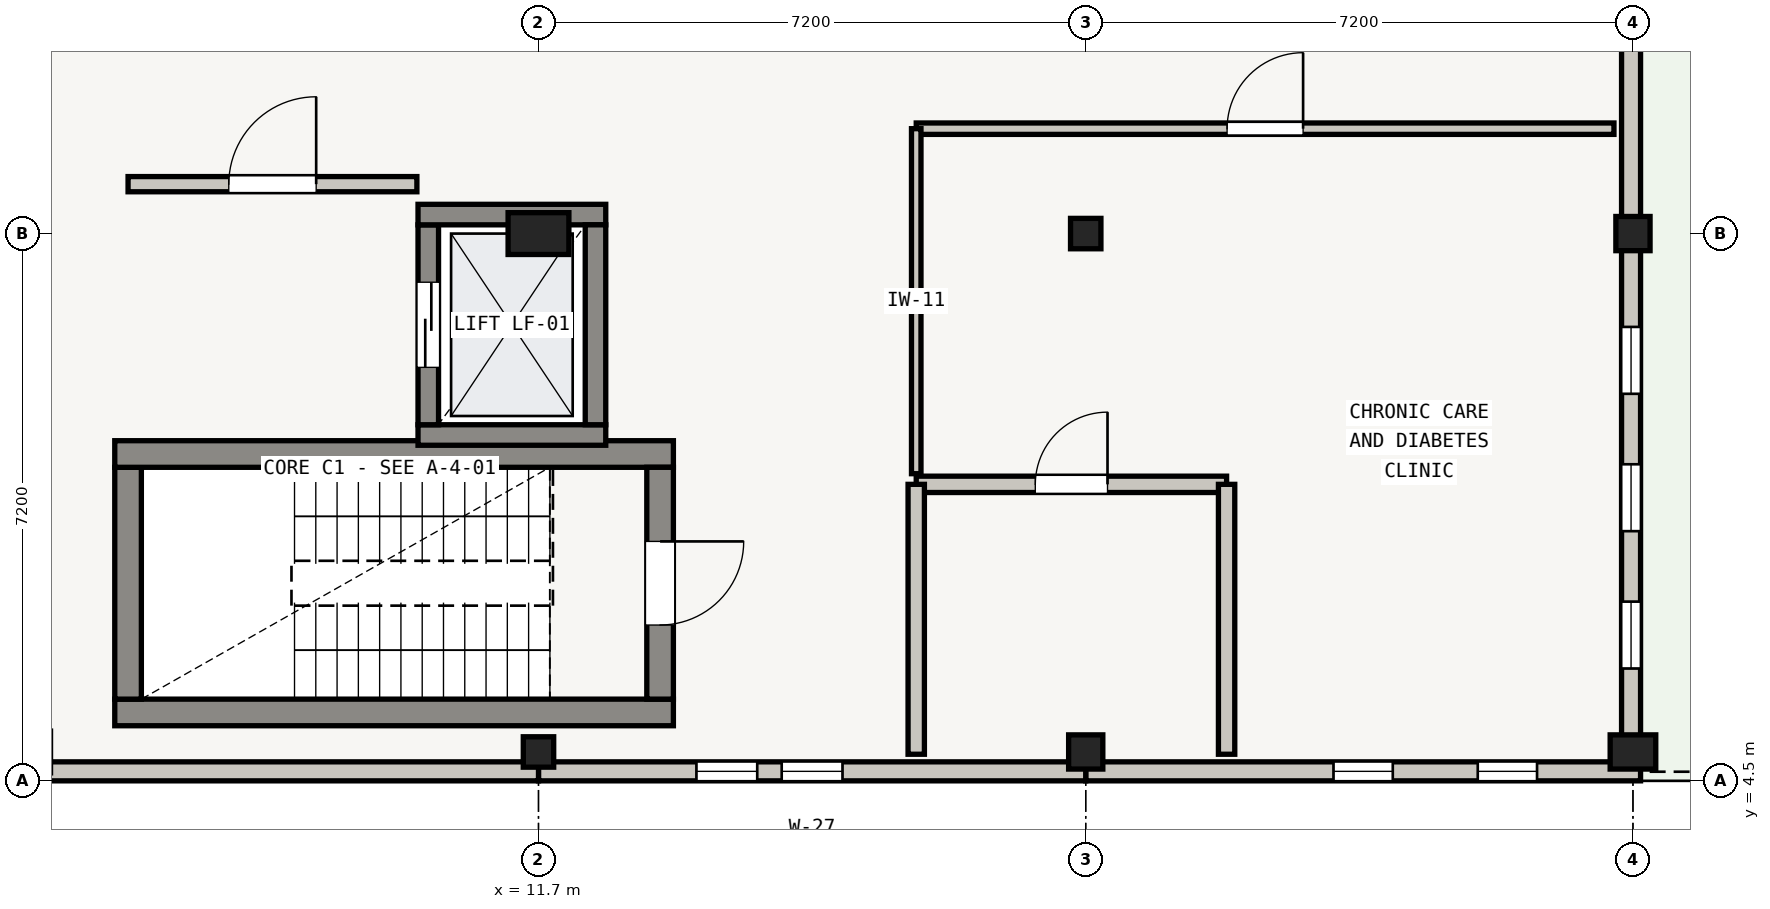
"""IFC4 building model, lengths in metres.
Left out: names, types, materials, properties, quantities, classifications, styles, units other than length and angle.
Written with IfcOpenShell. Run it as: python <this file> out.ifc"""

import sys

from ifc_helpers import new_model, si_unit, direction, frame, frame_2d, origin, origin_2d, place, context, subcontext, project, spatial, rectangle, extrude, element, fill, save


model = new_model("IFC4")
c1 = context("Model", 3, precision=1e-05, world=origin(), true_north=direction((0.0, 1.0)))
c2 = subcontext(c1, "Body", "Model", "MODEL_VIEW")
j1 = project(units=[si_unit("LENGTHUNIT", "METRE"), si_unit("PLANEANGLEUNIT", "RADIAN")], contexts=[c1])
p1 = place(None, origin())
s1 = spatial("IfcSite", under=j1, at=p1, CompositionType="ELEMENT")
p2 = place(p1, origin())
s2 = spatial("IfcBuilding", under=s1, at=p2, CompositionType="ELEMENT")
p3 = place(p2, frame((0.0, 0.0, 21.15)))
s3 = spatial("IfcBuildingStorey", under=s2, at=p3, CompositionType="ELEMENT", Elevation=21.15)
p4 = place(p3, frame((11.7, 4.88, 0.0), z_axis=(0.0, 0.0, 1.0), x_axis=(1.0, 0.0, 0.0)))
e1 = element("IfcColumn", 1, at=p4, inside=s3, PredefinedType="COLUMN", context=c2, shape_type="SweptSolid", body=[
    extrude(rectangle(XDim=0.4, YDim=0.4, at=origin_2d()), origin(), (0.0, 0.0, 1.0), 3.62),
])
p5 = place(p3, frame((11.7, 11.7, 0.0), z_axis=(0.0, 0.0, 1.0), x_axis=(1.0, 0.0, 0.0)))
e2 = element("IfcColumn", 2, at=p5, inside=s3, PredefinedType="COLUMN", context=c2, shape_type="SweptSolid", body=[
    extrude(rectangle(XDim=0.8, YDim=0.55, at=origin_2d()), origin(), (0.0, 0.0, 1.0), 3.62),
])
p6 = place(p3, frame((18.9, 4.88, 0.0), z_axis=(0.0, 0.0, 1.0), x_axis=(1.0, 0.0, 0.0)))
e3 = element("IfcColumn", 3, at=p6, inside=s3, PredefinedType="COLUMN", context=c2, shape_type="SweptSolid", body=[
    extrude(rectangle(XDim=0.45, YDim=0.45, at=origin_2d()), origin(), (0.0, 0.0, 1.0), 3.62),
])
p7 = place(p3, frame((18.9, 11.7, 0.0), z_axis=(0.0, 0.0, 1.0), x_axis=(1.0, 0.0, 0.0)))
e4 = element("IfcColumn", 4, at=p7, inside=s3, PredefinedType="COLUMN", context=c2, shape_type="SweptSolid", body=[
    extrude(rectangle(XDim=0.4, YDim=0.4, at=origin_2d()), origin(), (0.0, 0.0, 1.0), 3.62),
])
p8 = place(p3, frame((26.1, 4.88, 0.0), z_axis=(0.0, 0.0, 1.0), x_axis=(1.0, 0.0, 0.0)))
e5 = element("IfcColumn", 5, at=p8, inside=s3, PredefinedType="COLUMN", context=c2, shape_type="SweptSolid", body=[
    extrude(rectangle(XDim=0.6, YDim=0.45, at=origin_2d()), origin(), (0.0, 0.0, 1.0), 3.62),
])
p9 = place(p3, frame((26.1, 11.7, 0.0), z_axis=(0.0, 0.0, 1.0), x_axis=(1.0, 0.0, 0.0)))
e6 = element("IfcColumn", 6, at=p9, inside=s3, PredefinedType="COLUMN", context=c2, shape_type="SweptSolid", body=[
    extrude(rectangle(XDim=0.45, YDim=0.45, at=origin_2d()), origin(), (0.0, 0.0, 1.0), 3.62),
])
p10 = place(p3, frame((26.075, 18.65, 0.0), z_axis=(0.0, 0.0, 1.0), x_axis=(0.0, -1.0, 0.0)))
e7 = element("IfcWall", 7, at=p10, inside=s3, PredefinedType="STANDARD", context=c2, shape_type="SweptSolid", body=[
    extrude(rectangle(XDim=6.95, YDim=0.25, at=frame_2d((3.475, 0.0))), origin(), (0.0, 0.0, 1.0), 2.655),
])
p11 = place(p10, frame((2.9, 0.0, 0.19)))
e8 = element("IfcOpeningElement", 8, at=p11, cuts=e7, PredefinedType="OPENING", context=c2, shape_type="SweptSolid", body=[
    extrude(rectangle(XDim=1.15, YDim=2.02, at=frame_2d((0.575, 1.01))), frame((0.0, 0.125, 0.0), z_axis=(0.0, -1.0, 0.0), x_axis=(1.0, 0.0, 0.0)), (0.0, 0.0, 1.0), 0.25),
])
p12 = place(p3, frame((26.075, 11.7, 0.0), z_axis=(0.0, 0.0, 1.0), x_axis=(0.0, -1.0, 0.0)))
e9 = element("IfcWall", 9, at=p12, inside=s3, PredefinedType="STANDARD", context=c2, shape_type="SweptSolid", body=[
    extrude(rectangle(XDim=6.95, YDim=0.25, at=frame_2d((3.475, 0.0))), origin(), (0.0, 0.0, 1.0), 2.655),
])
p13 = place(p12, frame((1.228, 0.0, 0.55)))
e10 = element("IfcOpeningElement", 10, at=p13, cuts=e9, PredefinedType="OPENING", context=c2, shape_type="SweptSolid", body=[
    extrude(rectangle(XDim=0.88, YDim=1.8, at=frame_2d((0.44, 0.9))), frame((0.0, 0.125, 0.0), z_axis=(0.0, -1.0, 0.0), x_axis=(1.0, 0.0, 0.0)), (0.0, 0.0, 1.0), 0.25),
])
p14 = place(p12, frame((3.035, 0.0, 0.55)))
e11 = element("IfcOpeningElement", 11, at=p14, cuts=e9, PredefinedType="OPENING", context=c2, shape_type="SweptSolid", body=[
    extrude(rectangle(XDim=0.88, YDim=1.8, at=frame_2d((0.44, 0.9))), frame((0.0, 0.125, 0.0), z_axis=(0.0, -1.0, 0.0), x_axis=(1.0, 0.0, 0.0)), (0.0, 0.0, 1.0), 0.25),
])
p15 = place(p12, frame((4.842, 0.0, 0.55)))
e12 = element("IfcOpeningElement", 12, at=p15, cuts=e9, PredefinedType="OPENING", context=c2, shape_type="SweptSolid", body=[
    extrude(rectangle(XDim=0.88, YDim=1.8, at=frame_2d((0.44, 0.9))), frame((0.0, 0.125, 0.0), z_axis=(0.0, -1.0, 0.0), x_axis=(1.0, 0.0, 0.0)), (0.0, 0.0, 1.0), 0.25),
])
p16 = place(p3, frame((26.2, 4.625, 0.0), z_axis=(0.0, 0.0, 1.0), x_axis=(-1.0, 0.0, 0.0)))
e13 = element("IfcWall", 13, at=p16, inside=s3, PredefinedType="STANDARD", context=c2, shape_type="SweptSolid", body=[
    extrude(rectangle(XDim=7.3, YDim=0.25, at=frame_2d((3.65, 0.0))), origin(), (0.0, 0.0, 1.0), 3.055),
])
p17 = place(p16, frame((1.362, 0.0, 0.55)))
e14 = element("IfcOpeningElement", 14, at=p17, cuts=e13, PredefinedType="OPENING", context=c2, shape_type="SweptSolid", body=[
    extrude(rectangle(XDim=0.78, YDim=1.95, at=frame_2d((0.39, 0.975))), frame((0.0, 0.125, 0.0), z_axis=(0.0, -1.0, 0.0), x_axis=(1.0, 0.0, 0.0)), (0.0, 0.0, 1.0), 0.25),
])
p18 = place(p16, frame((3.26, 0.0, 0.55)))
e15 = element("IfcOpeningElement", 15, at=p18, cuts=e13, PredefinedType="OPENING", context=c2, shape_type="SweptSolid", body=[
    extrude(rectangle(XDim=0.78, YDim=1.95, at=frame_2d((0.39, 0.975))), frame((0.0, 0.125, 0.0), z_axis=(0.0, -1.0, 0.0), x_axis=(1.0, 0.0, 0.0)), (0.0, 0.0, 1.0), 0.25),
])
p19 = place(p3, frame((18.9, 4.625, 0.0), z_axis=(0.0, 0.0, 1.0), x_axis=(-1.0, 0.0, 0.0)))
e16 = element("IfcWall", 16, at=p19, inside=s3, PredefinedType="STANDARD", context=c2, shape_type="SweptSolid", body=[
    extrude(rectangle(XDim=7.2, YDim=0.25, at=frame_2d((3.6, 0.0))), origin(), (0.0, 0.0, 1.0), 3.055),
])
p20 = place(p19, frame((3.2, 0.0, 0.6)))
e17 = element("IfcOpeningElement", 17, at=p20, cuts=e16, PredefinedType="OPENING", context=c2, shape_type="SweptSolid", body=[
    extrude(rectangle(XDim=0.8, YDim=1.8, at=frame_2d((0.4, 0.9))), frame((0.0, 0.125, 0.0), z_axis=(0.0, -1.0, 0.0), x_axis=(1.0, 0.0, 0.0)), (0.0, 0.0, 1.0), 0.25),
])
p21 = place(p19, frame((4.322, 0.0, 0.6)))
e18 = element("IfcOpeningElement", 18, at=p21, cuts=e16, PredefinedType="OPENING", context=c2, shape_type="SweptSolid", body=[
    extrude(rectangle(XDim=0.8, YDim=1.8, at=frame_2d((0.4, 0.9))), frame((0.0, 0.125, 0.0), z_axis=(0.0, -1.0, 0.0), x_axis=(1.0, 0.0, 0.0)), (0.0, 0.0, 1.0), 0.25),
])
p22 = place(p3, frame((11.7, 4.625, 0.0), z_axis=(0.0, 0.0, 1.0), x_axis=(-1.0, 0.0, 0.0)))
e19 = element("IfcWall", 19, at=p22, inside=s3, PredefinedType="STANDARD", context=c2, shape_type="SweptSolid", body=[
    extrude(rectangle(XDim=7.2, YDim=0.25, at=frame_2d((3.6, 0.0))), origin(), (0.0, 0.0, 1.0), 3.055),
])
p23 = place(p3, frame((13.475, 5.4, 0.0), z_axis=(0.0, 0.0, 1.0), x_axis=(-1.0, 0.0, 0.0)))
e20 = element("IfcWall", 20, at=p23, inside=s3, PredefinedType="SHEAR", context=c2, shape_type="SweptSolid", body=[
    extrude(rectangle(XDim=7.35, YDim=0.35, at=frame_2d((3.675, 0.0))), origin(), (0.0, 0.0, 1.0), 3.62),
])
p24 = place(p3, frame((6.3, 5.575, 0.0), z_axis=(0.0, 0.0, 1.0), x_axis=(0.0, 1.0, 0.0)))
e21 = element("IfcWall", 21, at=p24, inside=s3, PredefinedType="SHEAR", context=c2, shape_type="SweptSolid", body=[
    extrude(rectangle(XDim=3.05, YDim=0.35, at=frame_2d((1.525, 0.0))), origin(), (0.0, 0.0, 1.0), 3.62),
])
p25 = place(p3, frame((6.125, 8.8, 0.0), z_axis=(0.0, 0.0, 1.0), x_axis=(1.0, 0.0, 0.0)))
e22 = element("IfcWall", 22, at=p25, inside=s3, PredefinedType="SHEAR", context=c2, shape_type="SweptSolid", body=[
    extrude(rectangle(XDim=7.35, YDim=0.35, at=frame_2d((3.675, 0.0))), origin(), (0.0, 0.0, 1.0), 3.62),
])
p26 = place(p3, frame((13.3, 8.625, 0.0), z_axis=(0.0, 0.0, 1.0), x_axis=(0.0, -1.0, 0.0)))
e23 = element("IfcWall", 23, at=p26, inside=s3, PredefinedType="SHEAR", context=c2, shape_type="SweptSolid", body=[
    extrude(rectangle(XDim=3.05, YDim=0.35, at=frame_2d((1.525, 0.0))), origin(), (0.0, 0.0, 1.0), 3.62),
])
p27 = place(p26, frame((0.975, 0.0, 0.0)))
e24 = element("IfcOpeningElement", 24, at=p27, cuts=e23, PredefinedType="OPENING", context=c2, shape_type="SweptSolid", body=[
    extrude(rectangle(XDim=1.1, YDim=2.05, at=frame_2d((0.55, 1.025))), frame((0.0, 0.175, 0.0), z_axis=(0.0, -1.0, 0.0), x_axis=(1.0, 0.0, 0.0)), (0.0, 0.0, 1.0), 0.35),
])
p28 = place(p3, frame((12.585, 9.05, 0.0), z_axis=(0.0, 0.0, 1.0), x_axis=(-1.0, 0.0, 0.0)))
e25 = element("IfcWall", 25, at=p28, inside=s3, PredefinedType="SHEAR", context=c2, shape_type="SweptSolid", body=[
    extrude(rectangle(XDim=2.47, YDim=0.27, at=frame_2d((1.235, 0.0))), origin(), (0.0, 0.0, 1.0), 3.62),
])
p29 = place(p3, frame((10.25, 9.185, 0.0), z_axis=(0.0, 0.0, 1.0), x_axis=(0.0, 1.0, 0.0)))
e26 = element("IfcWall", 26, at=p29, inside=s3, PredefinedType="SHEAR", context=c2, shape_type="SweptSolid", body=[
    extrude(rectangle(XDim=2.63, YDim=0.27, at=frame_2d((1.315, 0.0))), origin(), (0.0, 0.0, 1.0), 3.62),
])
p30 = place(p29, frame((0.755, 0.0, 0.0)))
e27 = element("IfcOpeningElement", 27, at=p30, cuts=e26, PredefinedType="OPENING", context=c2, shape_type="SweptSolid", body=[
    extrude(rectangle(XDim=1.12, YDim=2.1, at=frame_2d((0.56, 1.05))), frame((0.0, 0.135, 0.0), z_axis=(0.0, -1.0, 0.0), x_axis=(1.0, 0.0, 0.0)), (0.0, 0.0, 1.0), 0.27),
])
p31 = place(p3, frame((10.115, 11.95, 0.0), z_axis=(0.0, 0.0, 1.0), x_axis=(1.0, 0.0, 0.0)))
e28 = element("IfcWall", 28, at=p31, inside=s3, PredefinedType="SHEAR", context=c2, shape_type="SweptSolid", body=[
    extrude(rectangle(XDim=2.47, YDim=0.27, at=frame_2d((1.235, 0.0))), origin(), (0.0, 0.0, 1.0), 3.62),
])
p32 = place(p3, frame((12.45, 11.815, 0.0), z_axis=(0.0, 0.0, 1.0), x_axis=(0.0, -1.0, 0.0)))
e29 = element("IfcWall", 29, at=p32, inside=s3, PredefinedType="SHEAR", context=c2, shape_type="SweptSolid", body=[
    extrude(rectangle(XDim=2.63, YDim=0.27, at=frame_2d((1.315, 0.0))), origin(), (0.0, 0.0, 1.0), 3.62),
])
p33 = place(p3, frame((6.3, 12.35, 0.0), z_axis=(0.0, 0.0, 1.0), x_axis=(1.0, 0.0, 0.0)))
e30 = element("IfcWall", 30, at=p33, inside=s3, PredefinedType="SOLIDWALL", context=c2, shape_type="SweptSolid", body=[
    extrude(rectangle(XDim=3.8, YDim=0.2, at=frame_2d((1.9, 0.0))), origin(), (0.0, 0.0, 1.0), 2.64),
])
p34 = place(p33, frame((1.325, 0.0, 0.0)))
e31 = element("IfcOpeningElement", 31, at=p34, cuts=e30, PredefinedType="OPENING", context=c2, shape_type="SweptSolid", body=[
    extrude(rectangle(XDim=1.15, YDim=2.05, at=frame_2d((0.575, 1.025))), frame((0.0, 0.1, 0.0), z_axis=(0.0, -1.0, 0.0), x_axis=(1.0, 0.0, 0.0)), (0.0, 0.0, 1.0), 0.2),
])
p35 = place(p3, frame((16.67, 8.401, 0.0), z_axis=(0.0, 0.0, 1.0), x_axis=(1.0, 0.0, 0.0)))
e32 = element("IfcWall", 32, at=p35, inside=s3, PredefinedType="PLUMBINGWALL", context=c2, shape_type="SweptSolid", body=[
    extrude(rectangle(XDim=4.083, YDim=0.215, at=frame_2d((2.042, 0.0))), origin(), (0.0, 0.0, 1.0), 2.64),
])
p36 = place(p35, frame((1.567, 0.0, 0.0)))
e33 = element("IfcOpeningElement", 33, at=p36, cuts=e32, PredefinedType="OPENING", context=c2, shape_type="SweptSolid", body=[
    extrude(rectangle(XDim=0.95, YDim=2.05, at=frame_2d((0.475, 1.025))), frame((0.0, 0.107, 0.0), z_axis=(0.0, -1.0, 0.0), x_axis=(1.0, 0.0, 0.0)), (0.0, 0.0, 1.0), 0.215),
])
for number, where, z_axis, x_axis in (
    (34, (16.67, 4.85, 0.0), (0.0, 0.0, 1.0), (0.0, 1.0, 0.0)),
    (35, (20.753, 8.401, 0.0), (0.0, 0.0, 1.0), (0.0, -1.0, 0.0)),
):
    element("IfcWall", number, at=place(p3, frame(where, z_axis=z_axis, x_axis=x_axis)), inside=s3, PredefinedType="PLUMBINGWALL", context=c2, shape_type="SweptSolid", body=[
        extrude(rectangle(XDim=3.551, YDim=0.215, at=frame_2d((1.775, 0.0))), origin(), (0.0, 0.0, 1.0), 2.64),
    ])
p37 = place(p3, frame((16.67, 13.08, 0.0), z_axis=(0.0, 0.0, 1.0), x_axis=(1.0, 0.0, 0.0)))
e36 = element("IfcWall", 36, at=p37, inside=s3, PredefinedType="PARTITIONING", context=c2, shape_type="SweptSolid", body=[
    extrude(rectangle(XDim=9.18, YDim=0.15, at=frame_2d((4.59, 0.0))), origin(), (0.0, 0.0, 1.0), 2.64),
])
p38 = place(p37, frame((4.09, 0.0, 0.0)))
e37 = element("IfcOpeningElement", 37, at=p38, cuts=e36, PredefinedType="OPENING", context=c2, shape_type="SweptSolid", body=[
    extrude(rectangle(XDim=1.0, YDim=2.05, at=frame_2d((0.5, 1.025))), frame((0.0, 0.075, 0.0), z_axis=(0.0, -1.0, 0.0), x_axis=(1.0, 0.0, 0.0)), (0.0, 0.0, 1.0), 0.15),
])
p39 = place(p3, frame((16.67, 8.541, 0.0), z_axis=(0.0, 0.0, 1.0), x_axis=(0.0, 1.0, 0.0)))
e38 = element("IfcWall", 38, at=p39, inside=s3, PredefinedType="PARTITIONING", context=c2, shape_type="SweptSolid", body=[
    extrude(rectangle(XDim=4.539, YDim=0.125, at=frame_2d((2.27, 0.0))), origin(), (0.0, 0.0, 1.0), 2.64),
])
p40 = place(p13, origin())
e39 = element("IfcWindow", 39, at=p40, inside=s3, PartitioningType="SINGLE_PANEL", PredefinedType="WINDOW", context=c2, shape_type="SweptSolid", body=[
    extrude(rectangle(XDim=0.88, YDim=1.8, at=frame_2d((0.44, 0.9))), frame((0.0, 0.03, 0.0), z_axis=(0.0, -1.0, 0.0), x_axis=(1.0, 0.0, 0.0)), (0.0, 0.0, 1.0), 0.06),
])
fill(e10, e39)
p41 = place(p14, origin())
e40 = element("IfcWindow", 40, at=p41, inside=s3, PartitioningType="SINGLE_PANEL", PredefinedType="WINDOW", context=c2, shape_type="SweptSolid", body=[
    extrude(rectangle(XDim=0.88, YDim=1.8, at=frame_2d((0.44, 0.9))), frame((0.0, 0.03, 0.0), z_axis=(0.0, -1.0, 0.0), x_axis=(1.0, 0.0, 0.0)), (0.0, 0.0, 1.0), 0.06),
])
fill(e11, e40)
p42 = place(p15, origin())
e41 = element("IfcWindow", 41, at=p42, inside=s3, PartitioningType="SINGLE_PANEL", PredefinedType="WINDOW", context=c2, shape_type="SweptSolid", body=[
    extrude(rectangle(XDim=0.88, YDim=1.8, at=frame_2d((0.44, 0.9))), frame((0.0, 0.03, 0.0), z_axis=(0.0, -1.0, 0.0), x_axis=(1.0, 0.0, 0.0)), (0.0, 0.0, 1.0), 0.06),
])
fill(e12, e41)
p43 = place(p17, origin())
e42 = element("IfcWindow", 42, at=p43, inside=s3, PartitioningType="SINGLE_PANEL", PredefinedType="WINDOW", context=c2, shape_type="SweptSolid", body=[
    extrude(rectangle(XDim=0.78, YDim=1.95, at=frame_2d((0.39, 0.975))), frame((0.0, 0.03, 0.0), z_axis=(0.0, -1.0, 0.0), x_axis=(1.0, 0.0, 0.0)), (0.0, 0.0, 1.0), 0.06),
])
fill(e14, e42)
p44 = place(p18, origin())
e43 = element("IfcWindow", 43, at=p44, inside=s3, PartitioningType="SINGLE_PANEL", PredefinedType="WINDOW", context=c2, shape_type="SweptSolid", body=[
    extrude(rectangle(XDim=0.78, YDim=1.95, at=frame_2d((0.39, 0.975))), frame((0.0, 0.03, 0.0), z_axis=(0.0, -1.0, 0.0), x_axis=(1.0, 0.0, 0.0)), (0.0, 0.0, 1.0), 0.06),
])
fill(e15, e43)
p45 = place(p20, origin())
e44 = element("IfcWindow", 44, at=p45, inside=s3, PartitioningType="SINGLE_PANEL", PredefinedType="WINDOW", context=c2, shape_type="SweptSolid", body=[
    extrude(rectangle(XDim=0.8, YDim=1.8, at=frame_2d((0.4, 0.9))), frame((0.0, 0.03, 0.0), z_axis=(0.0, -1.0, 0.0), x_axis=(1.0, 0.0, 0.0)), (0.0, 0.0, 1.0), 0.06),
])
fill(e17, e44)
p46 = place(p21, origin())
e45 = element("IfcWindow", 45, at=p46, inside=s3, PartitioningType="SINGLE_PANEL", PredefinedType="WINDOW", context=c2, shape_type="SweptSolid", body=[
    extrude(rectangle(XDim=0.8, YDim=1.8, at=frame_2d((0.4, 0.9))), frame((0.0, 0.03, 0.0), z_axis=(0.0, -1.0, 0.0), x_axis=(1.0, 0.0, 0.0)), (0.0, 0.0, 1.0), 0.06),
])
fill(e18, e45)
p47 = place(p27, origin())
e46 = element("IfcDoor", 46, at=p47, inside=s3, OperationType="SINGLE_SWING_LEFT", PredefinedType="DOOR", context=c2, shape_type="SweptSolid", body=[
    extrude(rectangle(XDim=1.1, YDim=2.05, at=frame_2d((0.55, 1.025))), frame((0.0, 0.025, 0.0), z_axis=(0.0, -1.0, 0.0), x_axis=(1.0, 0.0, 0.0)), (0.0, 0.0, 1.0), 0.05),
])
fill(e24, e46)
p48 = place(p30, origin())
e47 = element("IfcDoor", 47, at=p48, inside=s3, OperationType="DOUBLE_DOOR_SLIDING", PredefinedType="DOOR", context=c2, shape_type="SweptSolid", body=[
    extrude(rectangle(XDim=1.12, YDim=2.1, at=frame_2d((0.56, 1.05))), frame((0.0, 0.025, 0.0), z_axis=(0.0, -1.0, 0.0), x_axis=(1.0, 0.0, 0.0)), (0.0, 0.0, 1.0), 0.05),
])
fill(e27, e47)
p49 = place(p34, origin())
e48 = element("IfcDoor", 48, at=p49, inside=s3, OperationType="SINGLE_SWING_RIGHT", PredefinedType="DOOR", context=c2, shape_type="SweptSolid", body=[
    extrude(rectangle(XDim=1.15, YDim=2.05, at=frame_2d((0.575, 1.025))), frame((0.0, 0.025, 0.0), z_axis=(0.0, -1.0, 0.0), x_axis=(1.0, 0.0, 0.0)), (0.0, 0.0, 1.0), 0.05),
])
fill(e31, e48)
p50 = place(p36, origin())
e49 = element("IfcDoor", 49, at=p50, inside=s3, OperationType="SINGLE_SWING_RIGHT", PredefinedType="DOOR", context=c2, shape_type="SweptSolid", body=[
    extrude(rectangle(XDim=0.95, YDim=2.05, at=frame_2d((0.475, 1.025))), frame((0.0, 0.025, 0.0), z_axis=(0.0, -1.0, 0.0), x_axis=(1.0, 0.0, 0.0)), (0.0, 0.0, 1.0), 0.05),
])
fill(e33, e49)
p51 = place(p38, origin())
e50 = element("IfcDoor", 50, at=p51, inside=s3, OperationType="SINGLE_SWING_RIGHT", PredefinedType="DOOR", context=c2, shape_type="SweptSolid", body=[
    extrude(rectangle(XDim=1.0, YDim=2.05, at=frame_2d((0.5, 1.025))), frame((0.0, 0.025, 0.0), z_axis=(0.0, -1.0, 0.0), x_axis=(1.0, 0.0, 0.0)), (0.0, 0.0, 1.0), 0.05),
])
fill(e37, e50)
save(model, sys.argv[1])
